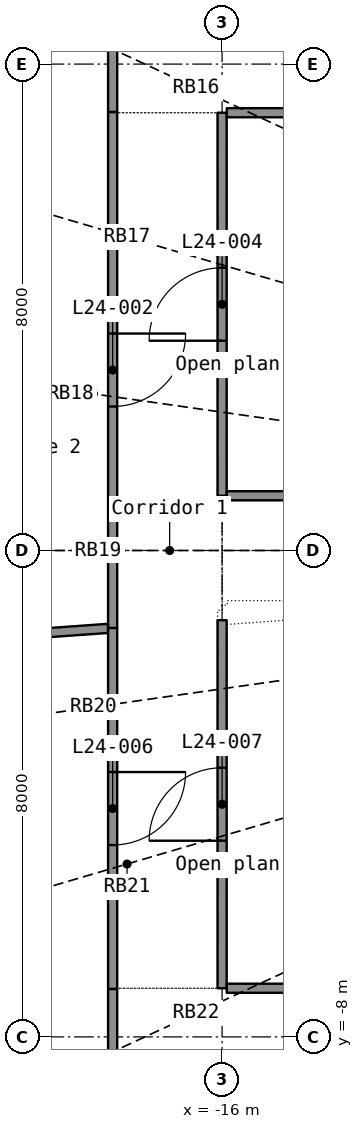
"""IFC4 building model, lengths in metres.
Left out: names, types, materials, properties, quantities, classifications, styles, units other than length and angle.
Written with IfcOpenShell. Run it as: python <this file> out.ifc"""

import sys

from ifc_helpers import new_model, si_unit, direction, frame, frame_2d, origin, place, context, subcontext, project, spatial, rectangle, extrude, element, fill, save


model = new_model("IFC4")
c1 = context("Model", 3, precision=1e-05, world=origin(), true_north=direction((0.0, 1.0)))
c2 = subcontext(c1, "Body", "Model", "MODEL_VIEW")
j1 = project(units=[si_unit("LENGTHUNIT", "METRE"), si_unit("PLANEANGLEUNIT", "RADIAN")], contexts=[c1])
p1 = place(None, origin())
s1 = spatial("IfcSite", under=j1, at=p1, CompositionType="ELEMENT")
p2 = place(p1, origin())
s2 = spatial("IfcBuilding", under=s1, at=p2, CompositionType="ELEMENT")
p3 = place(p2, frame((0.0, 0.0, 104.5)))
s3 = spatial("IfcBuildingStorey", under=s2, at=p3, CompositionType="ELEMENT", Elevation=104.5)
p4 = place(p3, frame((-17.8, 7.212, 0.0), z_axis=(0.0, 0.0, 1.0), x_axis=(0.0, -1.0, 0.0)))
e1 = element("IfcWall", 1, at=p4, inside=s3, PredefinedType="PARTITIONING", context=c2, shape_type="SweptSolid", body=[
    extrude(rectangle(XDim=8.488, YDim=0.15, at=frame_2d((4.244, 0.0))), origin(), (0.0, 0.0, 1.0), 2.4),
])
p5 = place(p4, frame((3.644, 0.0, 0.0)))
e2 = element("IfcOpeningElement", 2, at=p5, cuts=e1, PredefinedType="OPENING", context=c2, shape_type="SweptSolid", body=[
    extrude(rectangle(XDim=1.2, YDim=2.2, at=frame_2d((0.6, 1.1))), frame((0.0, 0.085, 0.0), z_axis=(0.0, -1.0, 0.0), x_axis=(1.0, 0.0, 0.0)), (0.0, 0.0, 1.0), 0.17),
])
p6 = place(p3, frame((-25.771, -1.847, 0.0), z_axis=(0.0, 0.0, 1.0), x_axis=(0.997442231, 0.071477241, 0.0)))
e3 = element("IfcWall", 3, at=p6, inside=s3, PredefinedType="PARTITIONING", context=c2, shape_type="SweptSolid", body=[
    extrude(rectangle(XDim=7.914, YDim=0.15, at=frame_2d((3.957, 0.0))), origin(), (0.0, 0.0, 1.0), 2.4),
])
p7 = place(p3, frame((-16.0, 0.9, 0.0), z_axis=(0.0, 0.0, 1.0), x_axis=(0.0, 1.0, 0.0)))
e4 = element("IfcWall", 4, at=p7, inside=s3, PredefinedType="PARTITIONING", context=c2, shape_type="SweptSolid", body=[
    extrude(rectangle(XDim=6.3, YDim=0.15, at=frame_2d((3.15, 0.0))), origin(), (0.0, 0.0, 1.0), 2.4),
])
p8 = place(p7, frame((2.55, 0.0, 0.0)))
e5 = element("IfcOpeningElement", 5, at=p8, cuts=e4, PredefinedType="OPENING", context=c2, shape_type="SweptSolid", body=[
    extrude(rectangle(XDim=1.2, YDim=2.2, at=frame_2d((0.6, 1.1))), frame((0.0, 0.085, 0.0), z_axis=(0.0, -1.0, 0.0), x_axis=(1.0, 0.0, 0.0)), (0.0, 0.0, 1.0), 0.17),
])
p9 = place(p3, frame((-16.0, -7.2, 0.0), z_axis=(0.0, 0.0, 1.0), x_axis=(0.0, 1.0, 0.0)))
e6 = element("IfcWall", 6, at=p9, inside=s3, PredefinedType="PARTITIONING", context=c2, shape_type="SweptSolid", body=[
    extrude(rectangle(XDim=6.053, YDim=0.15, at=frame_2d((3.027, 0.0))), origin(), (0.0, 0.0, 1.0), 2.4),
])
p10 = place(p9, frame((2.427, 0.0, 0.0)))
e7 = element("IfcOpeningElement", 7, at=p10, cuts=e6, PredefinedType="OPENING", context=c2, shape_type="SweptSolid", body=[
    extrude(rectangle(XDim=1.2, YDim=2.2, at=frame_2d((0.6, 1.1))), frame((0.0, 0.085, 0.0), z_axis=(0.0, -1.0, 0.0), x_axis=(1.0, 0.0, 0.0)), (0.0, 0.0, 1.0), 0.17),
])
p11 = place(p3, frame((-17.8, -1.276, 0.0), z_axis=(0.0, 0.0, 1.0), x_axis=(0.0, -1.0, 0.0)))
e8 = element("IfcWall", 8, at=p11, inside=s3, PredefinedType="PARTITIONING", context=c2, shape_type="SweptSolid", body=[
    extrude(rectangle(XDim=5.936, YDim=0.15, at=frame_2d((2.968, 0.0))), origin(), (0.0, 0.0, 1.0), 2.4),
])
p12 = place(p11, frame((2.368, 0.0, 0.0)))
e9 = element("IfcOpeningElement", 9, at=p12, cuts=e8, PredefinedType="OPENING", context=c2, shape_type="SweptSolid", body=[
    extrude(rectangle(XDim=1.2, YDim=2.2, at=frame_2d((0.6, 1.1))), frame((0.0, 0.085, 0.0), z_axis=(0.0, -1.0, 0.0), x_axis=(1.0, 0.0, 0.0)), (0.0, 0.0, 1.0), 0.17),
])
for number, where, z_axis, x_axis in (
    (10, (-15.923, 7.2, 0.0), (0.0, 0.0, 1.0), (1.0, 0.0, 0.0)),
    (11, (-12.0, -7.2, 0.0), (0.0, 0.0, 1.0), (-1.0, 0.0, 0.0)),
    (12, (-12.0, 0.9, 0.0), (0.0, 0.0, 1.0), (-1.0, 0.0, 0.0)),
):
    element("IfcWall", number, at=place(p3, frame(where, z_axis=z_axis, x_axis=x_axis)), inside=s3, PredefinedType="PARTITIONING", context=c2, shape_type="SweptSolid", body=[
        extrude(rectangle(XDim=3.923, YDim=0.15, at=frame_2d((1.961, 0.0))), origin(), (0.0, 0.0, 1.0), 2.4),
    ])
for number, where, z_axis, x_axis in (
    (13, (-17.8, -7.213, 0.0), (0.0, 0.0, 1.0), (0.0, -1.0, 0.0)),
    (14, (-17.8, 10.123, 0.0), (0.0, 0.0, 1.0), (0.0, -1.0, 0.0)),
):
    element("IfcWall", number, at=place(p3, frame(where, z_axis=z_axis, x_axis=x_axis)), inside=s3, PredefinedType="PARTITIONING", context=c2, shape_type="SweptSolid", body=[
        extrude(rectangle(XDim=2.91, YDim=0.15, at=frame_2d((1.455, 0.0))), origin(), (0.0, 0.0, 1.0), 2.4),
    ])
p13 = place(p5, origin())
e15 = element("IfcDoor", 15, at=p13, inside=s3, OperationType="DOUBLE_DOOR_SINGLE_SWING", PredefinedType="DOOR", context=c2, shape_type="SweptSolid", body=[
    extrude(rectangle(XDim=1.2, YDim=2.2, at=frame_2d((0.6, 1.1))), frame((0.0, 0.025, 0.0), z_axis=(0.0, -1.0, 0.0), x_axis=(1.0, 0.0, 0.0)), (0.0, 0.0, 1.0), 0.05),
])
fill(e2, e15)
p14 = place(p8, origin())
e16 = element("IfcDoor", 16, at=p14, inside=s3, OperationType="DOUBLE_DOOR_SINGLE_SWING", PredefinedType="DOOR", context=c2, shape_type="SweptSolid", body=[
    extrude(rectangle(XDim=1.2, YDim=2.2, at=frame_2d((0.6, 1.1))), frame((0.0, 0.025, 0.0), z_axis=(0.0, -1.0, 0.0), x_axis=(1.0, 0.0, 0.0)), (0.0, 0.0, 1.0), 0.05),
])
fill(e5, e16)
p15 = place(p12, origin())
e17 = element("IfcDoor", 17, at=p15, inside=s3, OperationType="DOUBLE_DOOR_SINGLE_SWING", PredefinedType="DOOR", context=c2, shape_type="SweptSolid", body=[
    extrude(rectangle(XDim=1.2, YDim=2.2, at=frame_2d((0.6, 1.1))), frame((0.0, 0.025, 0.0), z_axis=(0.0, -1.0, 0.0), x_axis=(1.0, 0.0, 0.0)), (0.0, 0.0, 1.0), 0.05),
])
fill(e9, e17)
p16 = place(p10, origin())
e18 = element("IfcDoor", 18, at=p16, inside=s3, OperationType="DOUBLE_DOOR_SINGLE_SWING", PredefinedType="DOOR", context=c2, shape_type="SweptSolid", body=[
    extrude(rectangle(XDim=1.2, YDim=2.2, at=frame_2d((0.6, 1.1))), frame((0.0, 0.025, 0.0), z_axis=(0.0, -1.0, 0.0), x_axis=(1.0, 0.0, 0.0)), (0.0, 0.0, 1.0), 0.05),
])
fill(e7, e18)
save(model, sys.argv[1])
